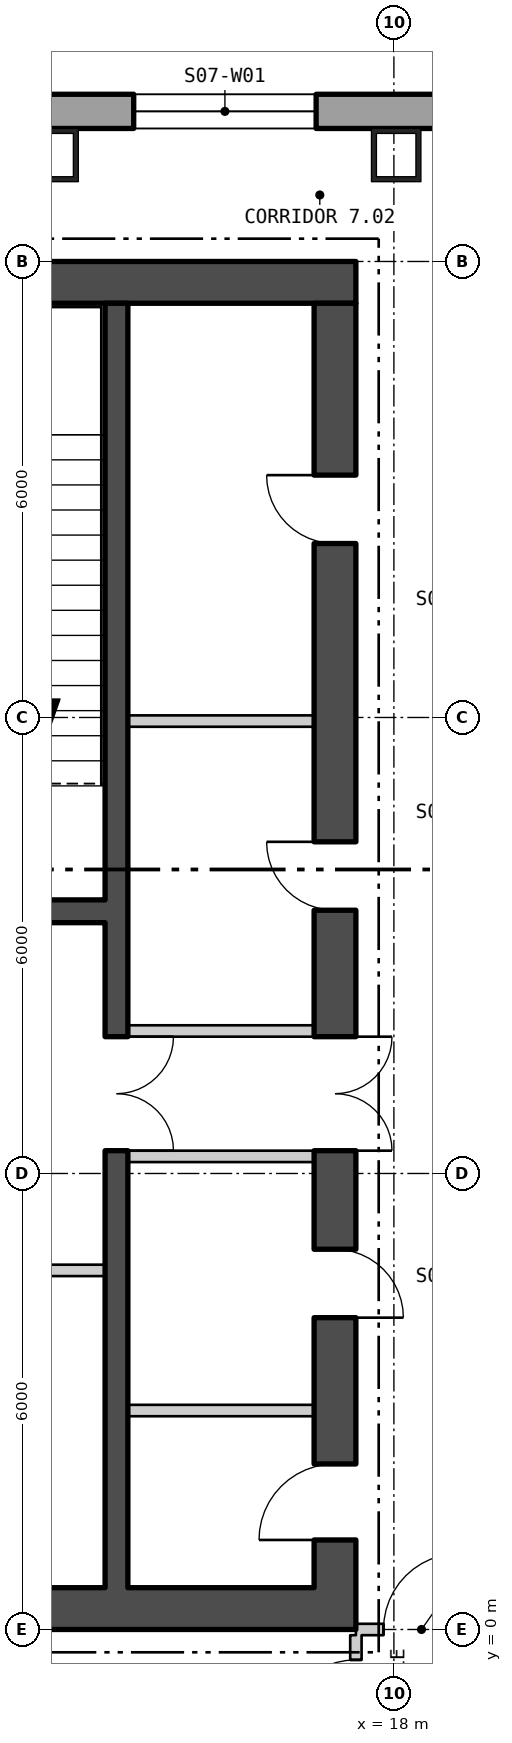
"""IFC4 building model, lengths in metres.
Left out: names, types, materials, properties, quantities, classifications, styles, units other than length and angle.
Written with IfcOpenShell. Run it as: python <this file> out.ifc"""

import sys

from ifc_helpers import new_model, si_unit, direction, frame, frame_2d, origin, origin_2d, place, context, subcontext, project, spatial, polyline, rectangle, hollow_rectangle, outline, extrude, element, fill, save


model = new_model("IFC4")
c1 = context("Model", 3, precision=1e-05, world=origin(), true_north=direction((0.0, 1.0)))
c2 = subcontext(c1, "Body", "Model", "MODEL_VIEW")
j1 = project(units=[si_unit("LENGTHUNIT", "METRE"), si_unit("PLANEANGLEUNIT", "RADIAN")], contexts=[c1])
p1 = place(None, origin())
s1 = spatial("IfcSite", under=j1, at=p1, CompositionType="ELEMENT")
p2 = place(p1, origin())
s2 = spatial("IfcBuilding", under=s1, at=p2, CompositionType="ELEMENT")
p3 = place(p2, frame((0.0, 0.0, 97.8)))
s3 = spatial("IfcBuildingStorey", under=s2, at=p3, CompositionType="ELEMENT", Elevation=97.8)
for number, where, z_axis, x_axis in (
    (1, (18.03, 19.4, 0.0), (0.0, 0.0, 1.0), (-1.0, 0.0, 0.0)),
    (2, (13.523, 19.4, 0.0), (0.0, 0.0, 1.0), (-1.0, 0.0, 0.0)),
):
    element("IfcColumn", number, at=place(p3, frame(where, z_axis=z_axis, x_axis=x_axis)), inside=s3, PredefinedType="COLUMN", context=c2, shape_type="SweptSolid", body=[
        extrude(hollow_rectangle(XDim=0.65, YDim=0.7, WallThickness=0.065, at=origin_2d()), origin(), (0.0, 0.0, 1.0), 4.5),
    ])
p4 = place(p3, frame((22.87, 19.975, -0.4), z_axis=(0.0, 0.0, 1.0), x_axis=(-1.0, 0.0, 0.0)))
e3 = element("IfcWall", 3, at=p4, inside=s3, PredefinedType="SOLIDWALL", context=c2, shape_type="SweptSolid", body=[
    extrude(outline(polyline([(-0.13, -0.225), (45.87, -0.225), (45.61, 0.225), (0.13, 0.225), (-0.13, -0.225)])), origin(), (0.0, 0.0, 1.0), 4.5),
])
p5 = place(p4, frame((5.893, 0.0, 1.3)))
e4 = element("IfcOpeningElement", 4, at=p5, cuts=e3, PredefinedType="OPENING", context=c2, shape_type="SweptSolid", body=[
    extrude(rectangle(XDim=2.4, YDim=2.6, at=frame_2d((1.2, 1.3))), frame((0.0, 0.235, 0.0), z_axis=(0.0, -1.0, 0.0), x_axis=(1.0, 0.0, 0.0)), (0.0, 0.0, 1.0), 0.47),
])
p6 = place(p4, frame((10.401, 0.0, 1.3)))
e5 = element("IfcOpeningElement", 5, at=p6, cuts=e3, PredefinedType="OPENING", context=c2, shape_type="SweptSolid", body=[
    extrude(rectangle(XDim=2.4, YDim=2.6, at=frame_2d((1.2, 1.3))), frame((0.0, 0.235, 0.0), z_axis=(0.0, -1.0, 0.0), x_axis=(1.0, 0.0, 0.0)), (0.0, 0.0, 1.0), 0.47),
])
p7 = place(p4, frame((14.909, 0.0, 1.3)))
e6 = element("IfcOpeningElement", 6, at=p7, cuts=e3, PredefinedType="OPENING", context=c2, shape_type="SweptSolid", body=[
    extrude(rectangle(XDim=2.4, YDim=2.6, at=frame_2d((1.2, 1.3))), frame((0.0, 0.235, 0.0), z_axis=(0.0, -1.0, 0.0), x_axis=(1.0, 0.0, 0.0)), (0.0, 0.0, 1.0), 0.47),
])
p8 = place(p4, frame((19.416, 0.0, 1.3)))
e7 = element("IfcOpeningElement", 7, at=p8, cuts=e3, PredefinedType="OPENING", context=c2, shape_type="SweptSolid", body=[
    extrude(rectangle(XDim=2.4, YDim=2.6, at=frame_2d((1.2, 1.3))), frame((0.0, 0.235, 0.0), z_axis=(0.0, -1.0, 0.0), x_axis=(1.0, 0.0, 0.0)), (0.0, 0.0, 1.0), 0.47),
])
p9 = place(p4, frame((23.924, 0.0, 1.3)))
e8 = element("IfcOpeningElement", 8, at=p9, cuts=e3, PredefinedType="OPENING", context=c2, shape_type="SweptSolid", body=[
    extrude(rectangle(XDim=2.4, YDim=2.6, at=frame_2d((1.2, 1.3))), frame((0.0, 0.235, 0.0), z_axis=(0.0, -1.0, 0.0), x_axis=(1.0, 0.0, 0.0)), (0.0, 0.0, 1.0), 0.47),
])
p10 = place(p4, frame((28.431, 0.0, 1.3)))
e9 = element("IfcOpeningElement", 9, at=p10, cuts=e3, PredefinedType="OPENING", context=c2, shape_type="SweptSolid", body=[
    extrude(rectangle(XDim=2.4, YDim=2.6, at=frame_2d((1.2, 1.3))), frame((0.0, 0.235, 0.0), z_axis=(0.0, -1.0, 0.0), x_axis=(1.0, 0.0, 0.0)), (0.0, 0.0, 1.0), 0.47),
])
p11 = place(p4, frame((32.939, 0.0, 1.3)))
e10 = element("IfcOpeningElement", 10, at=p11, cuts=e3, PredefinedType="OPENING", context=c2, shape_type="SweptSolid", body=[
    extrude(rectangle(XDim=2.4, YDim=2.6, at=frame_2d((1.2, 1.3))), frame((0.0, 0.235, 0.0), z_axis=(0.0, -1.0, 0.0), x_axis=(1.0, 0.0, 0.0)), (0.0, 0.0, 1.0), 0.47),
])
p12 = place(p4, frame((37.447, 0.0, 1.3)))
e11 = element("IfcOpeningElement", 11, at=p12, cuts=e3, PredefinedType="OPENING", context=c2, shape_type="SweptSolid", body=[
    extrude(rectangle(XDim=2.4, YDim=2.6, at=frame_2d((1.2, 1.3))), frame((0.0, 0.235, 0.0), z_axis=(0.0, -1.0, 0.0), x_axis=(1.0, 0.0, 0.0)), (0.0, 0.0, 1.0), 0.47),
])
p13 = place(p4, frame((41.916, 0.0, 1.3)))
e12 = element("IfcOpeningElement", 12, at=p13, cuts=e3, PredefinedType="OPENING", context=c2, shape_type="SweptSolid", body=[
    extrude(rectangle(XDim=2.4, YDim=2.6, at=frame_2d((1.2, 1.3))), frame((0.0, 0.235, 0.0), z_axis=(0.0, -1.0, 0.0), x_axis=(1.0, 0.0, 0.0)), (0.0, 0.0, 1.0), 0.47),
])
p14 = place(p3, frame((4.905, -28.133, -0.18), z_axis=(0.0, 0.0, 1.0), x_axis=(0.500000711659, 0.866024992908, 0.0)))
e13 = element("IfcWall", 13, at=p14, inside=s3, PredefinedType="SOLIDWALL", context=c2, shape_type="SweptSolid", body=[
    extrude(outline(polyline([(-0.13, -0.225), (45.87, -0.225), (45.61, 0.225), (0.13, 0.225), (-0.13, -0.225)])), origin(), (0.0, 0.0, 1.0), 4.28),
])
p15 = place(p14, frame((1.424, 0.0, 1.08)))
e14 = element("IfcOpeningElement", 14, at=p15, cuts=e13, PredefinedType="OPENING", context=c2, shape_type="SweptSolid", body=[
    extrude(rectangle(XDim=2.4, YDim=2.6, at=frame_2d((1.2, 1.3))), frame((0.0, 0.235, 0.0), z_axis=(0.0, -1.0, 0.0), x_axis=(1.0, 0.0, 0.0)), (0.0, 0.0, 1.0), 0.47),
])
p16 = place(p14, frame((5.893, 0.0, 1.08)))
e15 = element("IfcOpeningElement", 15, at=p16, cuts=e13, PredefinedType="OPENING", context=c2, shape_type="SweptSolid", body=[
    extrude(rectangle(XDim=2.4, YDim=2.6, at=frame_2d((1.2, 1.3))), frame((0.0, 0.235, 0.0), z_axis=(0.0, -1.0, 0.0), x_axis=(1.0, 0.0, 0.0)), (0.0, 0.0, 1.0), 0.47),
])
p17 = place(p14, frame((10.401, 0.0, 1.08)))
e16 = element("IfcOpeningElement", 16, at=p17, cuts=e13, PredefinedType="OPENING", context=c2, shape_type="SweptSolid", body=[
    extrude(rectangle(XDim=2.4, YDim=2.6, at=frame_2d((1.2, 1.3))), frame((0.0, 0.235, 0.0), z_axis=(0.0, -1.0, 0.0), x_axis=(1.0, 0.0, 0.0)), (0.0, 0.0, 1.0), 0.47),
])
p18 = place(p14, frame((14.909, 0.0, 1.08)))
e17 = element("IfcOpeningElement", 17, at=p18, cuts=e13, PredefinedType="OPENING", context=c2, shape_type="SweptSolid", body=[
    extrude(rectangle(XDim=2.4, YDim=2.6, at=frame_2d((1.2, 1.3))), frame((0.0, 0.235, 0.0), z_axis=(0.0, -1.0, 0.0), x_axis=(1.0, 0.0, 0.0)), (0.0, 0.0, 1.0), 0.47),
])
p19 = place(p14, frame((19.416, 0.0, 1.08)))
e18 = element("IfcOpeningElement", 18, at=p19, cuts=e13, PredefinedType="OPENING", context=c2, shape_type="SweptSolid", body=[
    extrude(rectangle(XDim=2.4, YDim=2.6, at=frame_2d((1.2, 1.3))), frame((0.0, 0.235, 0.0), z_axis=(0.0, -1.0, 0.0), x_axis=(1.0, 0.0, 0.0)), (0.0, 0.0, 1.0), 0.47),
])
p20 = place(p14, frame((28.431, 0.0, 1.08)))
e19 = element("IfcOpeningElement", 19, at=p20, cuts=e13, PredefinedType="OPENING", context=c2, shape_type="SweptSolid", body=[
    extrude(rectangle(XDim=2.4, YDim=2.6, at=frame_2d((1.2, 1.3))), frame((0.0, 0.235, 0.0), z_axis=(0.0, -1.0, 0.0), x_axis=(1.0, 0.0, 0.0)), (0.0, 0.0, 1.0), 0.47),
])
p21 = place(p14, frame((32.939, 0.0, 1.08)))
e20 = element("IfcOpeningElement", 20, at=p21, cuts=e13, PredefinedType="OPENING", context=c2, shape_type="SweptSolid", body=[
    extrude(rectangle(XDim=2.4, YDim=2.6, at=frame_2d((1.2, 1.3))), frame((0.0, 0.235, 0.0), z_axis=(0.0, -1.0, 0.0), x_axis=(1.0, 0.0, 0.0)), (0.0, 0.0, 1.0), 0.47),
])
p22 = place(p14, frame((37.447, 0.0, 1.08)))
e21 = element("IfcOpeningElement", 21, at=p22, cuts=e13, PredefinedType="OPENING", context=c2, shape_type="SweptSolid", body=[
    extrude(rectangle(XDim=2.4, YDim=2.6, at=frame_2d((1.2, 1.3))), frame((0.0, 0.235, 0.0), z_axis=(0.0, -1.0, 0.0), x_axis=(1.0, 0.0, 0.0)), (0.0, 0.0, 1.0), 0.47),
])
p23 = place(p14, frame((41.916, 0.0, 1.08)))
e22 = element("IfcOpeningElement", 22, at=p23, cuts=e13, PredefinedType="OPENING", context=c2, shape_type="SweptSolid", body=[
    extrude(rectangle(XDim=2.4, YDim=2.6, at=frame_2d((1.2, 1.3))), frame((0.0, 0.235, 0.0), z_axis=(0.0, -1.0, 0.0), x_axis=(1.0, 0.0, 0.0)), (0.0, 0.0, 1.0), 0.47),
])
p24 = place(p3, frame((-17.5, 0.275, 0.0), z_axis=(0.0, 0.0, 1.0), x_axis=(1.0, 0.0, 0.0)))
e23 = element("IfcWall", 23, at=p24, inside=s3, PredefinedType="SHEAR", context=c2, shape_type="SweptSolid", body=[
    extrude(rectangle(XDim=35.0, YDim=0.55, at=frame_2d((17.5, 0.0))), origin(), (0.0, 0.0, 1.0), 4.3),
])
p25 = place(p24, frame((12.0, 0.0, 0.0)))
e24 = element("IfcOpeningElement", 24, at=p25, cuts=e23, PredefinedType="OPENING", context=c2, shape_type="SweptSolid", body=[
    extrude(rectangle(XDim=1.8, YDim=2.4, at=frame_2d((0.9, 1.2))), frame((0.0, 0.285, 0.0), z_axis=(0.0, -1.0, 0.0), x_axis=(1.0, 0.0, 0.0)), (0.0, 0.0, 1.0), 0.57),
])
p26 = place(p24, frame((22.0, 0.0, 0.0)))
e25 = element("IfcOpeningElement", 25, at=p26, cuts=e23, PredefinedType="OPENING", context=c2, shape_type="SweptSolid", body=[
    extrude(rectangle(XDim=1.8, YDim=2.4, at=frame_2d((0.9, 1.2))), frame((0.0, 0.285, 0.0), z_axis=(0.0, -1.0, 0.0), x_axis=(1.0, 0.0, 0.0)), (0.0, 0.0, 1.0), 0.57),
])
p27 = place(p3, frame((-17.5, 17.725, 0.0), z_axis=(0.0, 0.0, 1.0), x_axis=(1.0, 0.0, 0.0)))
e26 = element("IfcWall", 26, at=p27, inside=s3, PredefinedType="SHEAR", context=c2, shape_type="SweptSolid", body=[
    extrude(rectangle(XDim=35.0, YDim=0.55, at=frame_2d((17.5, 0.0))), origin(), (0.0, 0.0, 1.0), 4.3),
])
p28 = place(p3, frame((17.225, 0.55, 0.0), z_axis=(0.0, 0.0, 1.0), x_axis=(0.0, 1.0, 0.0)))
e27 = element("IfcWall", 27, at=p28, inside=s3, PredefinedType="SHEAR", context=c2, shape_type="SweptSolid", body=[
    extrude(rectangle(XDim=16.9, YDim=0.55, at=frame_2d((8.45, 0.0))), origin(), (0.0, 0.0, 1.0), 4.3),
])
p29 = place(p28, frame((5.75, 0.0, 0.0)))
e28 = element("IfcOpeningElement", 28, at=p29, cuts=e27, PredefinedType="OPENING", context=c2, shape_type="SweptSolid", body=[
    extrude(rectangle(XDim=1.5, YDim=2.1, at=frame_2d((0.75, 1.05))), frame((0.0, 0.285, 0.0), z_axis=(0.0, -1.0, 0.0), x_axis=(1.0, 0.0, 0.0)), (0.0, 0.0, 1.0), 0.57),
])
p30 = place(p28, frame((0.628, 0.0, 0.0)))
e29 = element("IfcOpeningElement", 29, at=p30, cuts=e27, PredefinedType="OPENING", context=c2, shape_type="SweptSolid", body=[
    extrude(rectangle(XDim=1.0, YDim=2.1, at=frame_2d((0.5, 1.05))), frame((0.0, 0.285, 0.0), z_axis=(0.0, -1.0, 0.0), x_axis=(1.0, 0.0, 0.0)), (0.0, 0.0, 1.0), 0.57),
])
p31 = place(p28, frame((3.553, 0.0, 0.0)))
e30 = element("IfcOpeningElement", 30, at=p31, cuts=e27, PredefinedType="OPENING", context=c2, shape_type="SweptSolid", body=[
    extrude(rectangle(XDim=0.9, YDim=2.1, at=frame_2d((0.45, 1.05))), frame((0.0, 0.285, 0.0), z_axis=(0.0, -1.0, 0.0), x_axis=(1.0, 0.0, 0.0)), (0.0, 0.0, 1.0), 0.57),
])
p32 = place(p28, frame((8.914, 0.0, 0.0)))
e31 = element("IfcOpeningElement", 31, at=p32, cuts=e27, PredefinedType="OPENING", context=c2, shape_type="SweptSolid", body=[
    extrude(rectangle(XDim=0.9, YDim=2.1, at=frame_2d((0.45, 1.05))), frame((0.0, 0.285, 0.0), z_axis=(0.0, -1.0, 0.0), x_axis=(1.0, 0.0, 0.0)), (0.0, 0.0, 1.0), 0.57),
])
p33 = place(p28, frame((13.739, 0.0, 0.0)))
e32 = element("IfcOpeningElement", 32, at=p33, cuts=e27, PredefinedType="OPENING", context=c2, shape_type="SweptSolid", body=[
    extrude(rectangle(XDim=0.9, YDim=2.1, at=frame_2d((0.45, 1.05))), frame((0.0, 0.285, 0.0), z_axis=(0.0, -1.0, 0.0), x_axis=(1.0, 0.0, 0.0)), (0.0, 0.0, 1.0), 0.57),
])
p34 = place(p3, frame((14.35, 0.55, 0.0), z_axis=(0.0, 0.0, 1.0), x_axis=(0.0, 1.0, 0.0)))
e33 = element("IfcWall", 33, at=p34, inside=s3, PredefinedType="SHEAR", context=c2, shape_type="SweptSolid", body=[
    extrude(rectangle(XDim=16.9, YDim=0.3, at=frame_2d((8.45, 0.0))), origin(), (0.0, 0.0, 1.0), 4.3),
])
p35 = place(p34, frame((5.75, 0.0, 0.0)))
e34 = element("IfcOpeningElement", 34, at=p35, cuts=e33, PredefinedType="OPENING", context=c2, shape_type="SweptSolid", body=[
    extrude(rectangle(XDim=1.5, YDim=2.1, at=frame_2d((0.75, 1.05))), frame((0.0, 0.16, 0.0), z_axis=(0.0, -1.0, 0.0), x_axis=(1.0, 0.0, 0.0)), (0.0, 0.0, 1.0), 0.32),
])
p36 = place(p3, frame((11.0, 9.45, 0.0), z_axis=(0.0, 0.0, 1.0), x_axis=(1.0, 0.0, 0.0)))
e35 = element("IfcWall", 35, at=p36, inside=s3, PredefinedType="SHEAR", context=c2, shape_type="SweptSolid", body=[
    extrude(rectangle(XDim=3.2, YDim=0.3, at=frame_2d((1.6, 0.0))), origin(), (0.0, 0.0, 1.0), 4.3),
])
p37 = place(p36, frame((1.0, 0.0, 0.0)))
e36 = element("IfcOpeningElement", 36, at=p37, cuts=e35, PredefinedType="OPENING", context=c2, shape_type="SweptSolid", body=[
    extrude(rectangle(XDim=1.2, YDim=2.1, at=frame_2d((0.6, 1.05))), frame((0.0, 0.16, 0.0), z_axis=(0.0, -1.0, 0.0), x_axis=(1.0, 0.0, 0.0)), (0.0, 0.0, 1.0), 0.32),
])
p38 = place(p3, frame((11.0, 4.725, 0.0), z_axis=(0.0, 0.0, 1.0), x_axis=(1.0, 0.0, 0.0)))
e37 = element("IfcWall", 37, at=p38, inside=s3, PredefinedType="PARTITIONING", context=c2, shape_type="SweptSolid", body=[
    extrude(rectangle(XDim=3.2, YDim=0.15, at=frame_2d((1.6, 0.0))), origin(), (0.0, 0.0, 1.0), 4.3),
])
for number, where, z_axis, x_axis in (
    (38, (14.5, 6.225, 0.0), (0.0, 0.0, 1.0), (1.0, 0.0, 0.0)),
    (39, (14.5, 7.875, 0.0), (0.0, 0.0, 1.0), (1.0, 0.0, 0.0)),
    (40, (14.5, 2.881, 0.0), (0.0, 0.0, 1.0), (1.0, 0.0, 0.0)),
    (41, (14.5, 11.953, 0.0), (0.0, 0.0, 1.0), (1.0, 0.0, 0.0)),
):
    element("IfcWall", number, at=place(p3, frame(where, z_axis=z_axis, x_axis=x_axis)), inside=s3, PredefinedType="PARTITIONING", context=c2, shape_type="SweptSolid", body=[
        extrude(rectangle(XDim=2.45, YDim=0.15, at=frame_2d((1.225, 0.0))), origin(), (0.0, 0.0, 1.0), 4.3),
    ])
p39 = place(p3, frame((17.5, -1.725, 0.0), z_axis=(0.0, 0.0, 1.0), x_axis=(0.0, 1.0, 0.0)))
e42 = element("IfcWall", 42, at=p39, inside=s3, PredefinedType="PARTITIONING", context=c2, shape_type="SweptSolid", body=[
    extrude(rectangle(XDim=1.65, YDim=0.15, at=frame_2d((0.825, 0.0))), origin(), (0.0, 0.0, 1.0), 4.3),
])
p40 = place(p39, frame((0.325, 0.0, 0.0)))
e43 = element("IfcOpeningElement", 43, at=p40, cuts=e42, PredefinedType="OPENING", context=c2, shape_type="SweptSolid", body=[
    extrude(rectangle(XDim=1.0, YDim=2.1, at=frame_2d((0.5, 1.05))), frame((0.0, 0.085, 0.0), z_axis=(0.0, -1.0, 0.0), x_axis=(1.0, 0.0, 0.0)), (0.0, 0.0, 1.0), 0.17),
])
p41 = place(p3, frame((17.5, 0.0, 0.0), z_axis=(0.0, 0.0, 1.0), x_axis=(1.0, 0.0, 0.0)))
e44 = element("IfcWall", 44, at=p41, inside=s3, PredefinedType="PARTITIONING", context=c2, shape_type="SweptSolid", body=[
    extrude(rectangle(XDim=1.725, YDim=0.15, at=frame_2d((0.863, 0.0))), origin(), (0.0, 0.0, 1.0), 3.7),
])
p42 = place(p41, frame((0.363, 0.0, 0.0)))
e45 = element("IfcOpeningElement", 45, at=p42, cuts=e44, PredefinedType="OPENING", context=c2, shape_type="SweptSolid", body=[
    extrude(rectangle(XDim=1.0, YDim=2.1, at=frame_2d((0.5, 1.05))), frame((0.0, 0.085, 0.0), z_axis=(0.0, -1.0, 0.0), x_axis=(1.0, 0.0, 0.0)), (0.0, 0.0, 1.0), 0.17),
])
p43 = place(p5, origin())
e46 = element("IfcWindow", 46, at=p43, inside=s3, PartitioningType="SINGLE_PANEL", PredefinedType="WINDOW", context=c2, shape_type="SweptSolid", body=[
    extrude(rectangle(XDim=2.4, YDim=2.6, at=frame_2d((1.2, 1.3))), frame((0.0, 0.105, 0.0), z_axis=(0.0, -1.0, 0.0), x_axis=(1.0, 0.0, 0.0)), (0.0, 0.0, 1.0), 0.06),
])
fill(e4, e46)
p44 = place(p35, origin())
e47 = element("IfcDoor", 47, at=p44, inside=s3, OperationType="DOUBLE_DOOR_SINGLE_SWING", PredefinedType="DOOR", context=c2, shape_type="SweptSolid", body=[
    extrude(rectangle(XDim=1.5, YDim=2.1, at=frame_2d((0.75, 1.05))), frame((0.0, 0.025, 0.0), z_axis=(0.0, -1.0, 0.0), x_axis=(1.0, 0.0, 0.0)), (0.0, 0.0, 1.0), 0.05),
])
fill(e34, e47)
p45 = place(p29, origin())
e48 = element("IfcDoor", 48, at=p45, inside=s3, OperationType="DOUBLE_DOOR_SINGLE_SWING", PredefinedType="DOOR", context=c2, shape_type="SweptSolid", body=[
    extrude(rectangle(XDim=1.5, YDim=2.1, at=frame_2d((0.75, 1.05))), frame((0.0, 0.025, 0.0), z_axis=(0.0, -1.0, 0.0), x_axis=(1.0, 0.0, 0.0)), (0.0, 0.0, 1.0), 0.05),
])
fill(e28, e48)
p46 = place(p30, origin())
e49 = element("IfcDoor", 49, at=p46, inside=s3, OperationType="SINGLE_SWING_RIGHT", PredefinedType="DOOR", context=c2, shape_type="SweptSolid", body=[
    extrude(rectangle(XDim=1.0, YDim=2.1, at=frame_2d((0.5, 1.05))), frame((0.0, 0.025, 0.0), z_axis=(0.0, -1.0, 0.0), x_axis=(1.0, 0.0, 0.0)), (0.0, 0.0, 1.0), 0.05),
])
fill(e29, e49)
p47 = place(p31, origin())
e50 = element("IfcDoor", 50, at=p47, inside=s3, OperationType="SINGLE_SWING_LEFT", PredefinedType="DOOR", context=c2, shape_type="SweptSolid", body=[
    extrude(rectangle(XDim=0.9, YDim=2.1, at=frame_2d((0.45, 1.05))), frame((0.0, 0.025, 0.0), z_axis=(0.0, -1.0, 0.0), x_axis=(1.0, 0.0, 0.0)), (0.0, 0.0, 1.0), 0.05),
])
fill(e30, e50)
p48 = place(p32, origin())
e51 = element("IfcDoor", 51, at=p48, inside=s3, OperationType="SINGLE_SWING_LEFT", PredefinedType="DOOR", context=c2, shape_type="SweptSolid", body=[
    extrude(rectangle(XDim=0.9, YDim=2.1, at=frame_2d((0.45, 1.05))), frame((0.0, 0.025, 0.0), z_axis=(0.0, -1.0, 0.0), x_axis=(1.0, 0.0, 0.0)), (0.0, 0.0, 1.0), 0.05),
])
fill(e31, e51)
p49 = place(p33, origin())
e52 = element("IfcDoor", 52, at=p49, inside=s3, OperationType="SINGLE_SWING_LEFT", PredefinedType="DOOR", context=c2, shape_type="SweptSolid", body=[
    extrude(rectangle(XDim=0.9, YDim=2.1, at=frame_2d((0.45, 1.05))), frame((0.0, 0.025, 0.0), z_axis=(0.0, -1.0, 0.0), x_axis=(1.0, 0.0, 0.0)), (0.0, 0.0, 1.0), 0.05),
])
fill(e32, e52)
p50 = place(p40, origin())
e53 = element("IfcDoor", 53, at=p50, inside=s3, OperationType="SINGLE_SWING_RIGHT", PredefinedType="DOOR", context=c2, shape_type="SweptSolid", body=[
    extrude(rectangle(XDim=1.0, YDim=2.1, at=frame_2d((0.5, 1.05))), frame((0.0, 0.025, 0.0), z_axis=(0.0, -1.0, 0.0), x_axis=(1.0, 0.0, 0.0)), (0.0, 0.0, 1.0), 0.05),
])
fill(e43, e53)
p51 = place(p42, origin())
e54 = element("IfcDoor", 54, at=p51, inside=s3, OperationType="SINGLE_SWING_LEFT", PredefinedType="DOOR", context=c2, shape_type="SweptSolid", body=[
    extrude(rectangle(XDim=1.0, YDim=2.1, at=frame_2d((0.5, 1.05))), frame((0.0, 0.025, 0.0), z_axis=(0.0, -1.0, 0.0), x_axis=(1.0, 0.0, 0.0)), (0.0, 0.0, 1.0), 0.05),
])
fill(e45, e54)
save(model, sys.argv[1])
